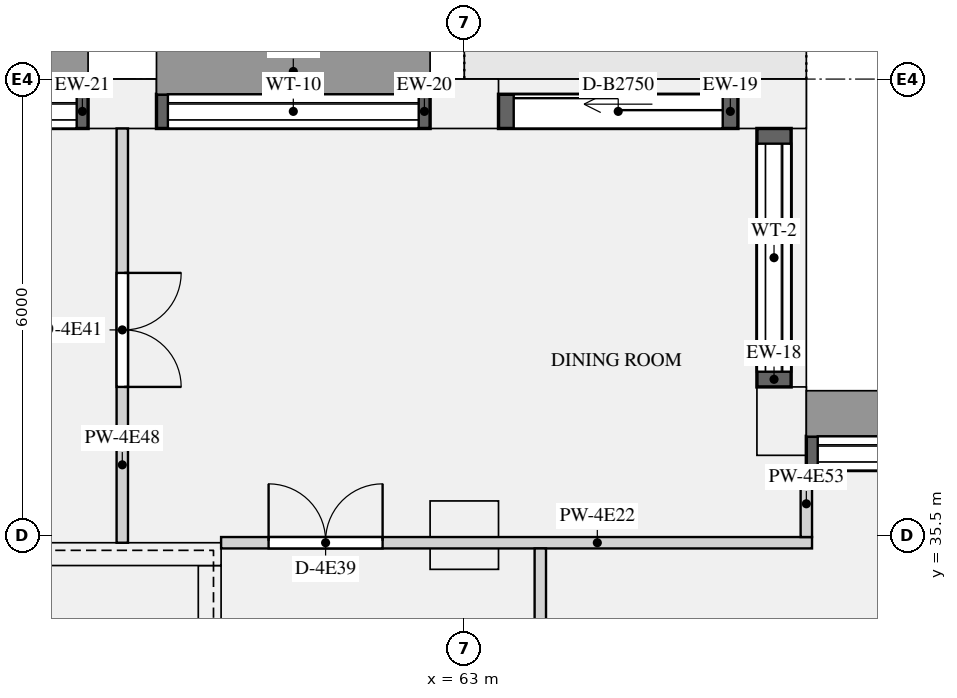
"""IFC4 building model, lengths in metres.
Left out: names, types, materials, properties, quantities, classifications, styles, units other than length and angle.
Written with IfcOpenShell. Run it as: python <this file> out.ifc"""

import sys

from ifc_helpers import new_model, si_unit, direction, frame, frame_2d, origin, origin_2d, place, context, subcontext, project, spatial, rectangle, extrude, element, fill, save


model = new_model("IFC4")
c1 = context("Model", 3, precision=1e-05, world=origin(), true_north=direction((0.0, 1.0)))
c2 = subcontext(c1, "Body", "Model", "MODEL_VIEW")
j1 = project(units=[si_unit("LENGTHUNIT", "METRE"), si_unit("PLANEANGLEUNIT", "RADIAN")], contexts=[c1])
p1 = place(None, origin())
s1 = spatial("IfcSite", under=j1, at=p1, CompositionType="ELEMENT")
p2 = place(p1, origin())
s2 = spatial("IfcBuilding", under=s1, at=p2, CompositionType="ELEMENT")
p3 = place(p2, frame((0.0, 0.0, 232.65)))
s3 = spatial("IfcBuildingStorey", under=s2, at=p3, CompositionType="ELEMENT", Elevation=232.65)
for number, where, z_axis, x_axis in (
    (1, (67.175, 37.0, 0.0), (0.0, 0.0, 1.0), (0.0, 1.0, 0.0)),
    (2, (67.05, 41.175, 0.0), (0.0, 0.0, 1.0), (-1.0, 0.0, 0.0)),
    (3, (63.0, 41.175, 0.0), (0.0, 0.0, 1.0), (-1.0, 0.0, 0.0)),
    (4, (58.5, 41.175, 0.0), (0.0, 0.0, 1.0), (-1.0, 0.0, 0.0)),
):
    element("IfcColumn", number, at=place(p3, frame(where, z_axis=z_axis, x_axis=x_axis)), inside=s3, PredefinedType="USERDEFINED", context=c2, shape_type="SweptSolid", body=[
        extrude(rectangle(XDim=0.9, YDim=0.65, at=origin_2d()), origin(), (0.0, 0.0, 1.0), 3.15),
    ])
p4 = place(p3, frame((63.0, 35.5, 0.0), z_axis=(0.0, 0.0, 1.0), x_axis=(1.0, 0.0, 0.0)))
e5 = element("IfcColumn", 5, at=p4, inside=s3, PredefinedType="COLUMN", context=c2, shape_type="SweptSolid", body=[
    extrude(rectangle(XDim=0.9, YDim=0.9, at=origin_2d()), origin(), (0.0, 0.0, 1.0), 3.15),
])
p5 = place(p3, frame((56.2, 35.25, 0.0), z_axis=(0.0, 0.0, 1.0), x_axis=(1.0, 0.0, 0.0)))
e6 = element("IfcWall", 6, at=p5, inside=s3, PredefinedType="SHEAR", context=c2, shape_type="SweptSolid", body=[
    extrude(rectangle(XDim=3.6, YDim=0.3, at=frame_2d((1.8, 0.0))), origin(), (0.0, 0.0, 1.0), 3.15),
])
p6 = place(p3, frame((59.65, 27.3, 0.0), z_axis=(0.0, 0.0, 1.0), x_axis=(0.0, 1.0, 0.0)))
e7 = element("IfcWall", 7, at=p6, inside=s3, PredefinedType="SHEAR", context=c2, shape_type="SweptSolid", body=[
    extrude(rectangle(XDim=7.8, YDim=0.3, at=frame_2d((3.9, 0.0))), origin(), (0.0, 0.0, 1.0), 3.15),
])
p7 = place(p3, frame((71.1, 36.575, 0.9), z_axis=(0.0, 0.0, 1.0), x_axis=(-1.0, 0.0, 0.0)))
e8 = element("IfcWall", 8, at=p7, inside=s3, PredefinedType="SOLIDWALL", context=c2, shape_type="SweptSolid", body=[
    extrude(rectangle(XDim=3.6, YDim=0.45, at=frame_2d((1.8, 0.0))), origin(), (0.0, 0.0, 1.0), 1.9),
])
p8 = place(p7, frame((0.15, 0.0, 0.15)))
e9 = element("IfcOpeningElement", 9, at=p8, cuts=e8, PredefinedType="OPENING", context=c2, shape_type="SweptSolid", body=[
    extrude(rectangle(XDim=3.3, YDim=1.5, at=frame_2d((1.65, 0.75))), frame((0.0, 0.235, 0.0), z_axis=(0.0, -1.0, 0.0), x_axis=(1.0, 0.0, 0.0)), (0.0, 0.0, 1.0), 0.47),
])
p9 = place(p3, frame((67.075, 37.45, 0.9), z_axis=(0.0, 0.0, 1.0), x_axis=(0.0, 1.0, 0.0)))
e10 = element("IfcWall", 10, at=p9, inside=s3, PredefinedType="SOLIDWALL", context=c2, shape_type="SweptSolid", body=[
    extrude(rectangle(XDim=3.4, YDim=0.45, at=frame_2d((1.7, 0.0))), origin(), (0.0, 0.0, 1.0), 1.9),
])
p10 = place(p9, frame((0.2, 0.0, 0.15)))
e11 = element("IfcOpeningElement", 11, at=p10, cuts=e10, PredefinedType="OPENING", context=c2, shape_type="SweptSolid", body=[
    extrude(rectangle(XDim=3.0, YDim=1.5, at=frame_2d((1.5, 0.75))), frame((0.0, 0.235, 0.0), z_axis=(0.0, -1.0, 0.0), x_axis=(1.0, 0.0, 0.0)), (0.0, 0.0, 1.0), 0.47),
])
p11 = place(p3, frame((66.6, 41.075, 0.0), z_axis=(0.0, 0.0, 1.0), x_axis=(-1.0, 0.0, 0.0)))
e12 = element("IfcWall", 12, at=p11, inside=s3, PredefinedType="SOLIDWALL", context=c2, shape_type="SweptSolid", body=[
    extrude(rectangle(XDim=3.15, YDim=0.45, at=frame_2d((1.575, 0.0))), origin(), (0.0, 0.0, 1.0), 2.8),
])
p12 = place(p11, frame((0.2, 0.0, 0.0)))
e13 = element("IfcOpeningElement", 13, at=p12, cuts=e12, PredefinedType="OPENING", context=c2, shape_type="SweptSolid", body=[
    extrude(rectangle(XDim=2.75, YDim=2.3, at=frame_2d((1.375, 1.15))), frame((0.0, 0.235, 0.0), z_axis=(0.0, -1.0, 0.0), x_axis=(1.0, 0.0, 0.0)), (0.0, 0.0, 1.0), 0.47),
])
p13 = place(p3, frame((62.55, 41.075, 0.9), z_axis=(0.0, 0.0, 1.0), x_axis=(-1.0, 0.0, 0.0)))
e14 = element("IfcWall", 14, at=p13, inside=s3, PredefinedType="SOLIDWALL", context=c2, shape_type="SweptSolid", body=[
    extrude(rectangle(XDim=3.6, YDim=0.45, at=frame_2d((1.8, 0.0))), origin(), (0.0, 0.0, 1.0), 1.9),
])
p14 = place(p13, frame((0.15, 0.0, 0.15)))
e15 = element("IfcOpeningElement", 15, at=p14, cuts=e14, PredefinedType="OPENING", context=c2, shape_type="SweptSolid", body=[
    extrude(rectangle(XDim=3.3, YDim=1.5, at=frame_2d((1.65, 0.75))), frame((0.0, 0.235, 0.0), z_axis=(0.0, -1.0, 0.0), x_axis=(1.0, 0.0, 0.0)), (0.0, 0.0, 1.0), 0.47),
])
p15 = place(p3, frame((58.05, 41.075, 0.9), z_axis=(0.0, 0.0, 1.0), x_axis=(-1.0, 0.0, 0.0)))
e16 = element("IfcWall", 16, at=p15, inside=s3, PredefinedType="SOLIDWALL", context=c2, shape_type="SweptSolid", body=[
    extrude(rectangle(XDim=3.6, YDim=0.45, at=frame_2d((1.8, 0.0))), origin(), (0.0, 0.0, 1.0), 1.9),
])
p16 = place(p15, frame((0.15, 0.0, 0.15)))
e17 = element("IfcOpeningElement", 17, at=p16, cuts=e16, PredefinedType="OPENING", context=c2, shape_type="SweptSolid", body=[
    extrude(rectangle(XDim=3.3, YDim=1.5, at=frame_2d((1.65, 0.75))), frame((0.0, 0.235, 0.0), z_axis=(0.0, -1.0, 0.0), x_axis=(1.0, 0.0, 0.0)), (0.0, 0.0, 1.0), 0.47),
])
p17 = place(p3, frame((59.8, 35.4, 0.0), z_axis=(0.0, 0.0, 1.0), x_axis=(1.0, 0.0, 0.0)))
e18 = element("IfcWall", 18, at=p17, inside=s3, PredefinedType="PARTITIONING", context=c2, shape_type="SweptSolid", body=[
    extrude(rectangle(XDim=7.775, YDim=0.15, at=frame_2d((3.887, 0.0))), origin(), (0.0, 0.0, 1.0), 2.8),
])
p18 = place(p17, frame((0.625, 0.0, 0.0)))
e19 = element("IfcOpeningElement", 19, at=p18, cuts=e18, PredefinedType="OPENING", context=c2, shape_type="SweptSolid", body=[
    extrude(rectangle(XDim=1.5, YDim=2.1, at=frame_2d((0.75, 1.05))), frame((0.0, 0.085, 0.0), z_axis=(0.0, -1.0, 0.0), x_axis=(1.0, 0.0, 0.0)), (0.0, 0.0, 1.0), 0.17),
])
p19 = place(p3, frame((58.5, 35.4, 0.0), z_axis=(0.0, 0.0, 1.0), x_axis=(0.0, 1.0, 0.0)))
e20 = element("IfcWall", 20, at=p19, inside=s3, PredefinedType="PARTITIONING", context=c2, shape_type="SweptSolid", body=[
    extrude(rectangle(XDim=5.45, YDim=0.15, at=frame_2d((2.725, 0.0))), origin(), (0.0, 0.0, 1.0), 2.8),
])
p20 = place(p19, frame((2.05, 0.0, 0.0)))
e21 = element("IfcOpeningElement", 21, at=p20, cuts=e20, PredefinedType="OPENING", context=c2, shape_type="SweptSolid", body=[
    extrude(rectangle(XDim=1.5, YDim=2.1, at=frame_2d((0.75, 1.05))), frame((0.0, 0.085, 0.0), z_axis=(0.0, -1.0, 0.0), x_axis=(1.0, 0.0, 0.0)), (0.0, 0.0, 1.0), 0.17),
])
p21 = place(p3, frame((64.0, 28.575, 0.0), z_axis=(0.0, 0.0, 1.0), x_axis=(0.0, 1.0, 0.0)))
e22 = element("IfcWall", 22, at=p21, inside=s3, PredefinedType="PARTITIONING", context=c2, shape_type="SweptSolid", body=[
    extrude(rectangle(XDim=6.75, YDim=0.15, at=frame_2d((3.375, 0.0))), origin(), (0.0, 0.0, 1.0), 2.8),
])
p22 = place(p21, frame((1.6, 0.0, 0.0)))
e23 = element("IfcOpeningElement", 23, at=p22, cuts=e22, PredefinedType="OPENING", context=c2, shape_type="SweptSolid", body=[
    extrude(rectangle(XDim=0.9, YDim=2.1, at=frame_2d((0.45, 1.05))), frame((0.0, 0.085, 0.0), z_axis=(0.0, -1.0, 0.0), x_axis=(1.0, 0.0, 0.0)), (0.0, 0.0, 1.0), 0.17),
])
p23 = place(p3, frame((67.5, 35.475, 0.0), z_axis=(0.0, 0.0, 1.0), x_axis=(0.0, 1.0, 0.0)))
e24 = element("IfcWall", 24, at=p23, inside=s3, PredefinedType="PARTITIONING", context=c2, shape_type="SweptSolid", body=[
    extrude(rectangle(XDim=0.875, YDim=0.15, at=frame_2d((0.438, 0.0))), origin(), (0.0, 0.0, 1.0), 2.8),
])
p24 = place(p8, origin())
e25 = element("IfcWindow", 25, at=p24, inside=s3, PartitioningType="SINGLE_PANEL", PredefinedType="WINDOW", context=c2, shape_type="SweptSolid", body=[
    extrude(rectangle(XDim=3.3, YDim=1.5, at=frame_2d((1.65, 0.75))), frame((0.0, -0.065, 0.0), z_axis=(0.0, -1.0, 0.0), x_axis=(1.0, 0.0, 0.0)), (0.0, 0.0, 1.0), 0.06),
])
fill(e9, e25)
p25 = place(p10, origin())
e26 = element("IfcWindow", 26, at=p25, inside=s3, PartitioningType="SINGLE_PANEL", PredefinedType="WINDOW", context=c2, shape_type="SweptSolid", body=[
    extrude(rectangle(XDim=3.0, YDim=1.5, at=frame_2d((1.5, 0.75))), frame((0.0, -0.065, 0.0), z_axis=(0.0, -1.0, 0.0), x_axis=(1.0, 0.0, 0.0)), (0.0, 0.0, 1.0), 0.06),
])
fill(e11, e26)
p26 = place(p12, origin())
e27 = element("IfcDoor", 27, at=p26, inside=s3, OperationType="SLIDING_TO_LEFT", PredefinedType="DOOR", context=c2, shape_type="SweptSolid", body=[
    extrude(rectangle(XDim=2.75, YDim=2.3, at=frame_2d((1.375, 1.15))), frame((0.0, -0.07, 0.0), z_axis=(0.0, -1.0, 0.0), x_axis=(1.0, 0.0, 0.0)), (0.0, 0.0, 1.0), 0.05),
])
fill(e13, e27)
p27 = place(p14, origin())
e28 = element("IfcWindow", 28, at=p27, inside=s3, PartitioningType="SINGLE_PANEL", PredefinedType="WINDOW", context=c2, shape_type="SweptSolid", body=[
    extrude(rectangle(XDim=3.3, YDim=1.5, at=frame_2d((1.65, 0.75))), frame((0.0, -0.065, 0.0), z_axis=(0.0, -1.0, 0.0), x_axis=(1.0, 0.0, 0.0)), (0.0, 0.0, 1.0), 0.06),
])
fill(e15, e28)
p28 = place(p16, origin())
e29 = element("IfcWindow", 29, at=p28, inside=s3, PartitioningType="SINGLE_PANEL", PredefinedType="WINDOW", context=c2, shape_type="SweptSolid", body=[
    extrude(rectangle(XDim=3.3, YDim=1.5, at=frame_2d((1.65, 0.75))), frame((0.0, -0.065, 0.0), z_axis=(0.0, -1.0, 0.0), x_axis=(1.0, 0.0, 0.0)), (0.0, 0.0, 1.0), 0.06),
])
fill(e17, e29)
p29 = place(p18, origin())
e30 = element("IfcDoor", 30, at=p29, inside=s3, OperationType="DOUBLE_DOOR_SINGLE_SWING", PredefinedType="DOOR", context=c2, shape_type="SweptSolid", body=[
    extrude(rectangle(XDim=1.5, YDim=2.1, at=frame_2d((0.75, 1.05))), frame((0.0, 0.025, 0.0), z_axis=(0.0, -1.0, 0.0), x_axis=(1.0, 0.0, 0.0)), (0.0, 0.0, 1.0), 0.05),
])
fill(e19, e30)
p30 = place(p20, frame((1.5, 0.0, 0.0), z_axis=(0.0, 0.0, 1.0), x_axis=(-1.0, 0.0, 0.0)))
e31 = element("IfcDoor", 31, at=p30, inside=s3, OperationType="DOUBLE_DOOR_SINGLE_SWING", PredefinedType="DOOR", context=c2, shape_type="SweptSolid", body=[
    extrude(rectangle(XDim=1.5, YDim=2.1, at=frame_2d((0.75, 1.05))), frame((0.0, 0.025, 0.0), z_axis=(0.0, -1.0, 0.0), x_axis=(1.0, 0.0, 0.0)), (0.0, 0.0, 1.0), 0.05),
])
fill(e21, e31)
save(model, sys.argv[1])
